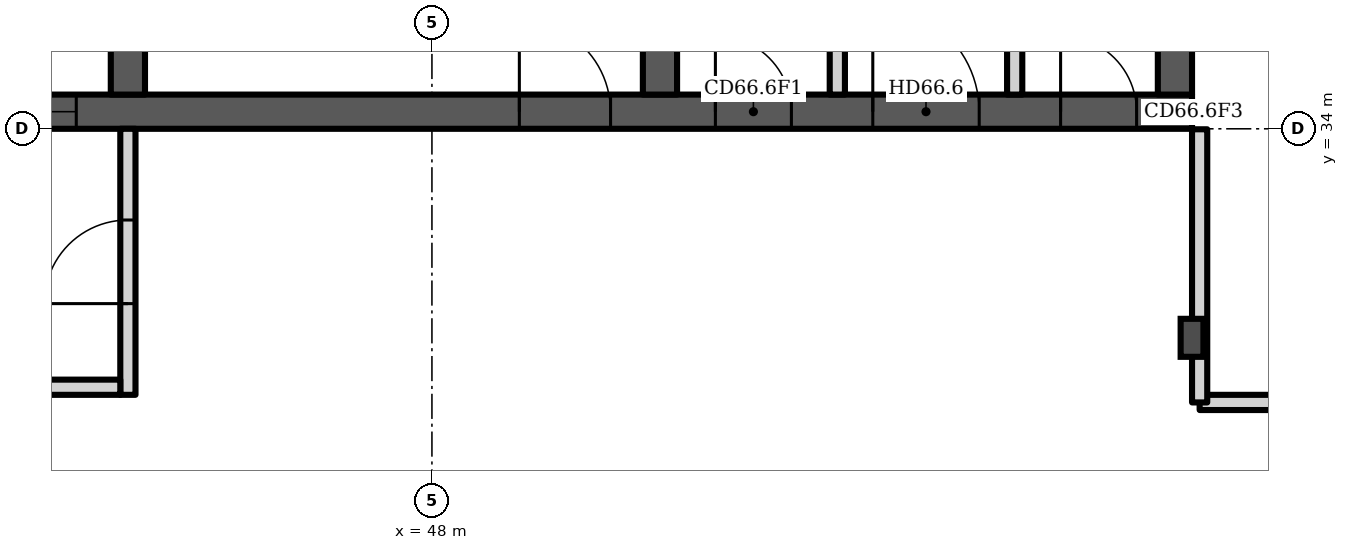
"""IFC4 building model, lengths in metres.
Left out: names, types, materials, properties, quantities, classifications, styles, units other than length and angle.
Written with IfcOpenShell. Run it as: python <this file> out.ifc"""

import sys

from ifc_helpers import new_model, si_unit, direction, frame, frame_2d, origin, origin_2d, place, context, subcontext, project, spatial, polyline, rectangle, i_section, outline, extrude, element, fill, save


model = new_model("IFC4")
c1 = context("Model", 3, precision=1e-05, world=origin(), true_north=direction((0.0, 1.0)))
c2 = subcontext(c1, "Body", "Model", "MODEL_VIEW")
j1 = project(units=[si_unit("LENGTHUNIT", "METRE"), si_unit("PLANEANGLEUNIT", "RADIAN")], contexts=[c1])
p1 = place(None, origin())
s1 = spatial("IfcSite", under=j1, at=p1, CompositionType="ELEMENT")
p2 = place(p1, origin())
s2 = spatial("IfcBuilding", under=s1, at=p2, CompositionType="ELEMENT")
p3 = place(p2, frame((0.0, 0.0, 261.1)))
s3 = spatial("IfcBuildingStorey", under=s2, at=p3, CompositionType="ELEMENT", Elevation=261.1)
p4 = place(p3, frame((23.0, 34.225, 0.0), z_axis=(0.0, 0.0, 1.0), x_axis=(1.0, 0.0, 0.0)))
e1 = element("IfcWall", 1, at=p4, inside=s3, PredefinedType="SHEAR", context=c2, shape_type="SweptSolid", body=[
    extrude(outline(polyline([(0.0, 0.0), (35.0, 0.0), (35.0, 3.2), (30.625, 3.2), (26.25, 3.2), (21.875, 3.2), (17.5, 3.2), (13.125, 3.2), (8.75, 3.2), (4.375, 3.2), (0.0, 2.365), (0.0, 0.0)])), frame((0.0, 0.225, 0.0), z_axis=(0.0, -1.0, 0.0), x_axis=(1.0, 0.0, 0.0)), (0.0, 0.0, 1.0), 0.45),
])
p5 = place(p4, frame((0.65, 0.0, 0.0)))
e2 = element("IfcOpeningElement", 2, at=p5, cuts=e1, PredefinedType="OPENING", context=c2, shape_type="SweptSolid", body=[
    extrude(rectangle(XDim=1.2, YDim=2.1, at=frame_2d((0.6, 1.05))), frame((0.0, 0.235, 0.0), z_axis=(0.0, -1.0, 0.0), x_axis=(1.0, 0.0, 0.0)), (0.0, 0.0, 1.0), 0.47),
])
p6 = place(p4, frame((7.679, 0.0, 0.0)))
e3 = element("IfcOpeningElement", 3, at=p6, cuts=e1, PredefinedType="OPENING", context=c2, shape_type="SweptSolid", body=[
    extrude(rectangle(XDim=1.1, YDim=2.1, at=frame_2d((0.55, 1.05))), frame((0.0, 0.235, 0.0), z_axis=(0.0, -1.0, 0.0), x_axis=(1.0, 0.0, 0.0)), (0.0, 0.0, 1.0), 0.47),
])
p7 = place(p4, frame((12.221, 0.0, 0.0)))
e4 = element("IfcOpeningElement", 4, at=p7, cuts=e1, PredefinedType="OPENING", context=c2, shape_type="SweptSolid", body=[
    extrude(rectangle(XDim=1.1, YDim=2.1, at=frame_2d((0.55, 1.05))), frame((0.0, 0.235, 0.0), z_axis=(0.0, -1.0, 0.0), x_axis=(1.0, 0.0, 0.0)), (0.0, 0.0, 1.0), 0.47),
])
p8 = place(p4, frame((9.8, 0.0, 0.0)))
e5 = element("IfcOpeningElement", 5, at=p8, cuts=e1, PredefinedType="OPENING", context=c2, shape_type="SweptSolid", body=[
    extrude(rectangle(XDim=1.4, YDim=2.1, at=frame_2d((0.7, 1.05))), frame((0.0, 0.235, 0.0), z_axis=(0.0, -1.0, 0.0), x_axis=(1.0, 0.0, 0.0)), (0.0, 0.0, 1.0), 0.47),
])
p9 = place(p4, frame((14.679, 0.0, 0.0)))
e6 = element("IfcOpeningElement", 6, at=p9, cuts=e1, PredefinedType="OPENING", context=c2, shape_type="SweptSolid", body=[
    extrude(rectangle(XDim=1.1, YDim=2.1, at=frame_2d((0.55, 1.05))), frame((0.0, 0.235, 0.0), z_axis=(0.0, -1.0, 0.0), x_axis=(1.0, 0.0, 0.0)), (0.0, 0.0, 1.0), 0.47),
])
p10 = place(p4, frame((19.221, 0.0, 0.0)))
e7 = element("IfcOpeningElement", 7, at=p10, cuts=e1, PredefinedType="OPENING", context=c2, shape_type="SweptSolid", body=[
    extrude(rectangle(XDim=1.1, YDim=2.1, at=frame_2d((0.55, 1.05))), frame((0.0, 0.235, 0.0), z_axis=(0.0, -1.0, 0.0), x_axis=(1.0, 0.0, 0.0)), (0.0, 0.0, 1.0), 0.47),
])
p11 = place(p4, frame((26.15, 0.0, 0.0)))
e8 = element("IfcOpeningElement", 8, at=p11, cuts=e1, PredefinedType="OPENING", context=c2, shape_type="SweptSolid", body=[
    extrude(rectangle(XDim=1.2, YDim=2.1, at=frame_2d((0.6, 1.05))), frame((0.0, 0.235, 0.0), z_axis=(0.0, -1.0, 0.0), x_axis=(1.0, 0.0, 0.0)), (0.0, 0.0, 1.0), 0.47),
])
p12 = place(p4, frame((28.729, 0.0, 0.0)))
e9 = element("IfcOpeningElement", 9, at=p12, cuts=e1, PredefinedType="OPENING", context=c2, shape_type="SweptSolid", body=[
    extrude(rectangle(XDim=1.0, YDim=2.1, at=frame_2d((0.5, 1.05))), frame((0.0, 0.235, 0.0), z_axis=(0.0, -1.0, 0.0), x_axis=(1.0, 0.0, 0.0)), (0.0, 0.0, 1.0), 0.47),
])
p13 = place(p4, frame((33.271, 0.0, 0.0)))
e10 = element("IfcOpeningElement", 10, at=p13, cuts=e1, PredefinedType="OPENING", context=c2, shape_type="SweptSolid", body=[
    extrude(rectangle(XDim=1.0, YDim=2.1, at=frame_2d((0.5, 1.05))), frame((0.0, 0.235, 0.0), z_axis=(0.0, -1.0, 0.0), x_axis=(1.0, 0.0, 0.0)), (0.0, 0.0, 1.0), 0.47),
])
p14 = place(p4, frame((30.8, 0.0, 0.0)))
e11 = element("IfcOpeningElement", 11, at=p14, cuts=e1, PredefinedType="OPENING", context=c2, shape_type="SweptSolid", body=[
    extrude(rectangle(XDim=1.4, YDim=2.1, at=frame_2d((0.7, 1.05))), frame((0.0, 0.235, 0.0), z_axis=(0.0, -1.0, 0.0), x_axis=(1.0, 0.0, 0.0)), (0.0, 0.0, 1.0), 0.47),
])
p15 = place(p3, frame((44.0, 34.45, 0.0), z_axis=(0.0, 0.0, 1.0), x_axis=(0.0, 1.0, 0.0)))
e12 = element("IfcWall", 12, at=p15, inside=s3, PredefinedType="SHEAR", context=c2, shape_type="SweptSolid", body=[
    extrude(rectangle(XDim=14.479, YDim=0.45, at=frame_2d((7.239, 0.0))), origin(), (0.0, 0.0, 1.0), 3.2),
])
p16 = place(p15, frame((11.524, 0.0, 0.0)))
e13 = element("IfcOpeningElement", 13, at=p16, cuts=e12, PredefinedType="OPENING", context=c2, shape_type="SweptSolid", body=[
    extrude(rectangle(XDim=1.0, YDim=2.1, at=frame_2d((0.5, 1.05))), frame((0.0, 0.235, 0.0), z_axis=(0.0, -1.0, 0.0), x_axis=(1.0, 0.0, 0.0)), (0.0, 0.0, 1.0), 0.47),
])
p17 = place(p15, frame((3.95, 0.0, 0.0)))
e14 = element("IfcOpeningElement", 14, at=p17, cuts=e12, PredefinedType="OPENING", context=c2, shape_type="SweptSolid", body=[
    extrude(rectangle(XDim=1.1, YDim=2.1, at=frame_2d((0.55, 1.05))), frame((0.0, 0.235, 0.0), z_axis=(0.0, -1.0, 0.0), x_axis=(1.0, 0.0, 0.0)), (0.0, 0.0, 1.0), 0.47),
])
p18 = place(p3, frame((51.0, 34.45, 0.0), z_axis=(0.0, 0.0, 1.0), x_axis=(0.0, 1.0, 0.0)))
e15 = element("IfcWall", 15, at=p18, inside=s3, PredefinedType="SHEAR", context=c2, shape_type="SweptSolid", body=[
    extrude(rectangle(XDim=13.866, YDim=0.45, at=frame_2d((6.933, 0.0))), origin(), (0.0, 0.0, 1.0), 3.2),
])
p19 = place(p18, frame((3.95, 0.0, 0.0)))
e16 = element("IfcOpeningElement", 16, at=p19, cuts=e15, PredefinedType="OPENING", context=c2, shape_type="SweptSolid", body=[
    extrude(rectangle(XDim=1.1, YDim=2.1, at=frame_2d((0.55, 1.05))), frame((0.0, 0.235, 0.0), z_axis=(0.0, -1.0, 0.0), x_axis=(1.0, 0.0, 0.0)), (0.0, 0.0, 1.0), 0.47),
])
p20 = place(p3, frame((57.775, 34.45, 0.0), z_axis=(0.0, 0.0, 1.0), x_axis=(0.0, 1.0, 0.0)))
e17 = element("IfcWall", 17, at=p20, inside=s3, PredefinedType="SHEAR", context=c2, shape_type="SweptSolid", body=[
    extrude(rectangle(XDim=13.273, YDim=0.45, at=frame_2d((6.637, 0.0))), origin(), (0.0, 0.0, 1.0), 3.2),
])
p21 = place(p3, frame((58.0, 31.25, 0.0), z_axis=(0.0, 0.0, 1.0), x_axis=(1.0, 0.0, 0.0)))
e18 = element("IfcColumn", 18, at=p21, inside=s3, PredefinedType="COLUMN", context=c2, shape_type="SweptSolid", body=[
    extrude(i_section(OverallWidth=0.3, OverallDepth=0.5, WebThickness=0.014, FlangeThickness=0.028, FilletRadius=0.027, at=origin_2d()), origin(), (0.0, 0.0, 1.0), 3.2),
])
p22 = place(p3, frame((0.0, 0.0, -0.0)))
e19 = element("IfcWall", 19, at=p22, inside=s3, PredefinedType="PARTITIONING", context=c2, shape_type="SweptSolid", body=[
    extrude(outline(polyline([(41.567, 37.1), (39.433, 37.1), (39.433, 34.45), (39.233, 34.45), (39.233, 37.3), (37.225, 37.3), (37.225, 37.5), (39.233, 37.5), (39.433, 37.5), (39.433, 37.3), (41.567, 37.3), (41.767, 37.3), (43.775, 37.3), (43.775, 37.1), (41.767, 37.1), (41.767, 34.45), (41.567, 34.45), (41.567, 37.1)])), origin(), (0.0, 0.0, 1.0), 2.8),
])
p23 = place(p3, frame((0.0, 0.0, -0.0)))
e20 = element("IfcWall", 20, at=p23, inside=s3, PredefinedType="PARTITIONING", context=c2, shape_type="SweptSolid", body=[
    extrude(outline(polyline([(53.233, 34.45), (53.233, 37.3), (53.433, 37.3), (53.433, 34.45), (53.233, 34.45)])), origin(), (0.0, 0.0, 1.0), 2.8),
])
p24 = place(p3, frame((0.0, 0.0, -0.0)))
e21 = element("IfcWall", 21, at=p24, inside=s3, PredefinedType="PARTITIONING", context=c2, shape_type="SweptSolid", body=[
    extrude(outline(polyline([(55.567, 34.45), (55.567, 37.3), (55.767, 37.3), (55.767, 34.45), (55.567, 34.45)])), origin(), (0.0, 0.0, 1.0), 2.8),
])
p25 = place(p3, frame((63.5, 30.4, 0.0), z_axis=(0.0, 0.0, 1.0), x_axis=(-1.0, 0.0, 0.0)))
e22 = element("IfcWall", 22, at=p25, inside=s3, PredefinedType="PARTITIONING", context=c2, shape_type="SweptSolid", body=[
    extrude(rectangle(XDim=5.4, YDim=0.2, at=frame_2d((2.7, 0.0))), origin(), (0.0, 0.0, 1.0), 2.8),
])
p26 = place(p25, frame((2.2, 0.0, 0.0)))
e23 = element("IfcOpeningElement", 23, at=p26, cuts=e22, PredefinedType="OPENING", context=c2, shape_type="SweptSolid", body=[
    extrude(rectangle(XDim=1.0, YDim=2.1, at=frame_2d((0.5, 1.05))), frame((0.0, 0.11, 0.0), z_axis=(0.0, -1.0, 0.0), x_axis=(1.0, 0.0, 0.0)), (0.0, 0.0, 1.0), 0.22),
])
p27 = place(p3, frame((58.1, 30.4, 0.0), z_axis=(0.0, 0.0, 1.0), x_axis=(0.0, 1.0, 0.0)))
e24 = element("IfcWall", 24, at=p27, inside=s3, PredefinedType="PARTITIONING", context=c2, shape_type="SweptSolid", body=[
    extrude(rectangle(XDim=3.594, YDim=0.2, at=frame_2d((1.797, 0.0))), origin(), (0.0, 0.0, 1.0), 2.8),
])
p28 = place(p3, frame((44.0, 30.5, 0.0), z_axis=(0.0, 0.0, 1.0), x_axis=(0.0, 1.0, 0.0)))
e25 = element("IfcWall", 25, at=p28, inside=s3, PredefinedType="PARTITIONING", context=c2, shape_type="SweptSolid", body=[
    extrude(rectangle(XDim=3.5, YDim=0.2, at=frame_2d((1.75, 0.0))), origin(), (0.0, 0.0, 1.0), 2.8),
])
p29 = place(p28, frame((1.2, 0.0, 0.0)))
e26 = element("IfcOpeningElement", 26, at=p29, cuts=e25, PredefinedType="OPENING", context=c2, shape_type="SweptSolid", body=[
    extrude(rectangle(XDim=1.1, YDim=2.1, at=frame_2d((0.55, 1.05))), frame((0.0, 0.11, 0.0), z_axis=(0.0, -1.0, 0.0), x_axis=(1.0, 0.0, 0.0)), (0.0, 0.0, 1.0), 0.22),
])
p30 = place(p3, frame((41.1, 30.6, 0.0), z_axis=(0.0, 0.0, 1.0), x_axis=(1.0, 0.0, 0.0)))
e27 = element("IfcWall", 27, at=p30, inside=s3, PredefinedType="PARTITIONING", context=c2, shape_type="SweptSolid", body=[
    extrude(rectangle(XDim=2.8, YDim=0.2, at=frame_2d((1.4, 0.0))), origin(), (0.0, 0.0, 1.0), 2.8),
])
p31 = place(p10, origin())
e28 = element("IfcDoor", 28, at=p31, inside=s3, OperationType="DOUBLE_DOOR_SLIDING", PredefinedType="DOOR", context=c2, shape_type="SweptSolid", body=[
    extrude(rectangle(XDim=1.1, YDim=2.1, at=frame_2d((0.55, 1.05))), frame((0.0, 0.025, 0.0), z_axis=(0.0, -1.0, 0.0), x_axis=(1.0, 0.0, 0.0)), (0.0, 0.0, 1.0), 0.05),
])
fill(e7, e28)
p32 = place(p11, origin())
e29 = element("IfcDoor", 29, at=p32, inside=s3, OperationType="SINGLE_SWING_LEFT", PredefinedType="DOOR", context=c2, shape_type="SweptSolid", body=[
    extrude(rectangle(XDim=1.2, YDim=2.1, at=frame_2d((0.6, 1.05))), frame((0.0, 0.025, 0.0), z_axis=(0.0, -1.0, 0.0), x_axis=(1.0, 0.0, 0.0)), (0.0, 0.0, 1.0), 0.05),
])
fill(e8, e29)
p33 = place(p12, origin())
e30 = element("IfcDoor", 30, at=p33, inside=s3, OperationType="SINGLE_SWING_LEFT", PredefinedType="DOOR", context=c2, shape_type="SweptSolid", body=[
    extrude(rectangle(XDim=1.0, YDim=2.1, at=frame_2d((0.5, 1.05))), frame((0.0, 0.025, 0.0), z_axis=(0.0, -1.0, 0.0), x_axis=(1.0, 0.0, 0.0)), (0.0, 0.0, 1.0), 0.05),
])
fill(e9, e30)
p34 = place(p13, origin())
e31 = element("IfcDoor", 31, at=p34, inside=s3, OperationType="SINGLE_SWING_LEFT", PredefinedType="DOOR", context=c2, shape_type="SweptSolid", body=[
    extrude(rectangle(XDim=1.0, YDim=2.1, at=frame_2d((0.5, 1.05))), frame((0.0, 0.025, 0.0), z_axis=(0.0, -1.0, 0.0), x_axis=(1.0, 0.0, 0.0)), (0.0, 0.0, 1.0), 0.05),
])
fill(e10, e31)
p35 = place(p14, origin())
e32 = element("IfcDoor", 32, at=p35, inside=s3, OperationType="DOUBLE_DOOR_SINGLE_SWING", PredefinedType="DOOR", context=c2, shape_type="SweptSolid", body=[
    extrude(rectangle(XDim=1.4, YDim=2.1, at=frame_2d((0.7, 1.05))), frame((0.0, 0.025, 0.0), z_axis=(0.0, -1.0, 0.0), x_axis=(1.0, 0.0, 0.0)), (0.0, 0.0, 1.0), 0.05),
])
fill(e11, e32)
p36 = place(p29, origin())
e33 = element("IfcDoor", 33, at=p36, inside=s3, OperationType="SINGLE_SWING_LEFT", PredefinedType="DOOR", context=c2, shape_type="SweptSolid", body=[
    extrude(rectangle(XDim=1.1, YDim=2.1, at=frame_2d((0.55, 1.05))), frame((0.0, 0.025, 0.0), z_axis=(0.0, -1.0, 0.0), x_axis=(1.0, 0.0, 0.0)), (0.0, 0.0, 1.0), 0.05),
])
fill(e26, e33)
save(model, sys.argv[1])
